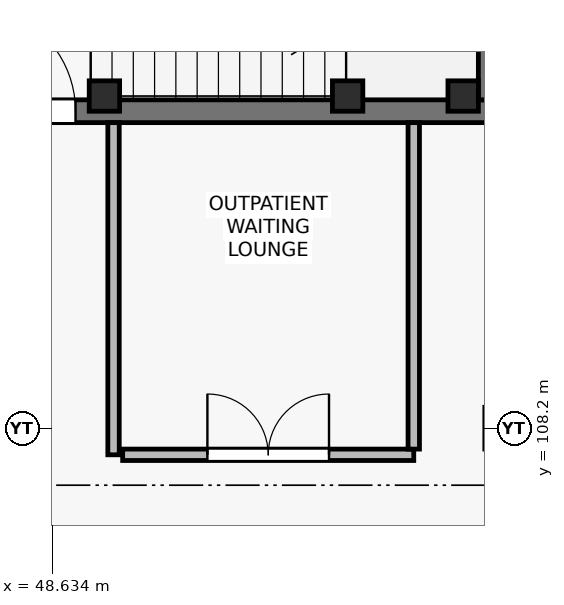
"""IFC4 building model, lengths in metres.
Left out: names, types, materials, properties, quantities, classifications, styles, units other than length and angle.
Written with IfcOpenShell. Run it as: python <this file> out.ifc"""

import sys

from ifc_helpers import new_model, si_unit, direction, frame, frame_2d, origin, origin_2d, place, context, subcontext, project, spatial, rectangle, extrude, element, fill, save


model = new_model("IFC4")
c1 = context("Model", 3, precision=1e-05, world=origin(), true_north=direction((0.0, 1.0)))
c2 = subcontext(c1, "Body", "Model", "MODEL_VIEW")
j1 = project(units=[si_unit("LENGTHUNIT", "METRE"), si_unit("PLANEANGLEUNIT", "RADIAN")], contexts=[c1])
p1 = place(None, origin())
s1 = spatial("IfcSite", under=j1, at=p1, CompositionType="ELEMENT")
p2 = place(p1, origin())
s2 = spatial("IfcBuilding", under=s1, at=p2, CompositionType="ELEMENT")
p3 = place(p2, frame((0.0, 0.0, 9.6)))
s3 = spatial("IfcBuildingStorey", under=s2, at=p3, CompositionType="ELEMENT", Elevation=9.6)
for number, where, z_axis, x_axis in (
    (1, (49.32, 112.57, 0.0), (0.0, 0.0, 1.0), (1.0, 0.0, 0.0)),
    (2, (52.52, 112.57, 0.0), (0.0, 0.0, 1.0), (1.0, 0.0, 0.0)),
    (3, (54.04, 112.57, 0.0), (0.0, 0.0, 1.0), (1.0, 0.0, 0.0)),
):
    element("IfcColumn", number, at=place(p3, frame(where, z_axis=z_axis, x_axis=x_axis)), inside=s3, PredefinedType="COLUMN", context=c2, shape_type="SweptSolid", body=[
        extrude(rectangle(XDim=0.4, YDim=0.4, at=origin_2d()), origin(), (0.0, 0.0, 1.0), 4.5),
    ])
p4 = place(p3, frame((46.95, 112.37, 0.0), z_axis=(0.0, 0.0, 1.0), x_axis=(1.0, 0.0, 0.0)))
e4 = element("IfcWall", 4, at=p4, inside=s3, PredefinedType="SHEAR", context=c2, shape_type="SweptSolid", body=[
    extrude(rectangle(XDim=7.59, YDim=0.3, at=frame_2d((3.795, 0.0))), origin(), (0.0, 0.0, 1.0), 4.24),
])
p5 = place(p4, frame((0.59, 0.0, 0.0)))
e5 = element("IfcOpeningElement", 5, at=p5, cuts=e4, PredefinedType="OPENING", context=c2, shape_type="SweptSolid", body=[
    extrude(rectangle(XDim=1.4, YDim=2.2, at=frame_2d((0.7, 1.1))), frame((0.0, 0.16, 0.0), z_axis=(0.0, -1.0, 0.0), x_axis=(1.0, 0.0, 0.0)), (0.0, 0.0, 1.0), 0.32),
])
p6 = place(p3, frame((54.39, 112.52, 0.0), z_axis=(0.0, 0.0, 1.0), x_axis=(0.0, 1.0, 0.0)))
e6 = element("IfcWall", 6, at=p6, inside=s3, PredefinedType="SHEAR", context=c2, shape_type="SweptSolid", body=[
    extrude(rectangle(XDim=3.33, YDim=0.3, at=frame_2d((1.665, 0.0))), origin(), (0.0, 0.0, 1.0), 4.24),
])
p7 = place(p3, frame((49.44, 107.85, 0.0), z_axis=(0.0, 0.0, 1.0), x_axis=(0.0, 1.0, 0.0)))
e7 = element("IfcWall", 7, at=p7, inside=s3, PredefinedType="PARTITIONING", context=c2, shape_type="SweptSolid", body=[
    extrude(rectangle(XDim=4.37, YDim=0.15, at=frame_2d((2.185, 0.0))), origin(), (0.0, 0.0, 1.0), 4.24),
])
p8 = place(p3, frame((49.56, 107.85, 0.0), z_axis=(0.0, 0.0, 1.0), x_axis=(1.0, 0.0, 0.0)))
e8 = element("IfcWall", 8, at=p8, inside=s3, PredefinedType="PARTITIONING", context=c2, shape_type="SweptSolid", body=[
    extrude(rectangle(XDim=3.83, YDim=0.15, at=frame_2d((1.915, 0.0))), origin(), (0.0, 0.0, 1.0), 3.74),
])
p9 = place(p8, frame((1.115, 0.0, 0.0)))
e9 = element("IfcOpeningElement", 9, at=p9, cuts=e8, PredefinedType="OPENING", context=c2, shape_type="SweptSolid", body=[
    extrude(rectangle(XDim=1.6, YDim=2.2, at=frame_2d((0.8, 1.1))), frame((0.0, 0.085, 0.0), z_axis=(0.0, -1.0, 0.0), x_axis=(1.0, 0.0, 0.0)), (0.0, 0.0, 1.0), 0.17),
])
p10 = place(p3, frame((53.39, 107.925, 0.0), z_axis=(0.0, 0.0, 1.0), x_axis=(0.0, 1.0, 0.0)))
e10 = element("IfcWall", 10, at=p10, inside=s3, PredefinedType="PARTITIONING", context=c2, shape_type="SweptSolid", body=[
    extrude(rectangle(XDim=4.295, YDim=0.15, at=frame_2d((2.147, 0.0))), origin(), (0.0, 0.0, 1.0), 4.24),
])
p11 = place(p5, origin())
e11 = element("IfcDoor", 11, at=p11, inside=s3, OperationType="SINGLE_SWING_LEFT", PredefinedType="DOOR", context=c2, shape_type="SweptSolid", body=[
    extrude(rectangle(XDim=1.4, YDim=2.2, at=frame_2d((0.7, 1.1))), frame((0.0, 0.025, 0.0), z_axis=(0.0, -1.0, 0.0), x_axis=(1.0, 0.0, 0.0)), (0.0, 0.0, 1.0), 0.05),
])
fill(e5, e11)
p12 = place(p9, origin())
e12 = element("IfcDoor", 12, at=p12, inside=s3, OperationType="DOUBLE_DOOR_SINGLE_SWING", PredefinedType="DOOR", context=c2, shape_type="SweptSolid", body=[
    extrude(rectangle(XDim=1.6, YDim=2.2, at=frame_2d((0.8, 1.1))), frame((0.0, 0.025, 0.0), z_axis=(0.0, -1.0, 0.0), x_axis=(1.0, 0.0, 0.0)), (0.0, 0.0, 1.0), 0.05),
])
fill(e9, e12)
save(model, sys.argv[1])
